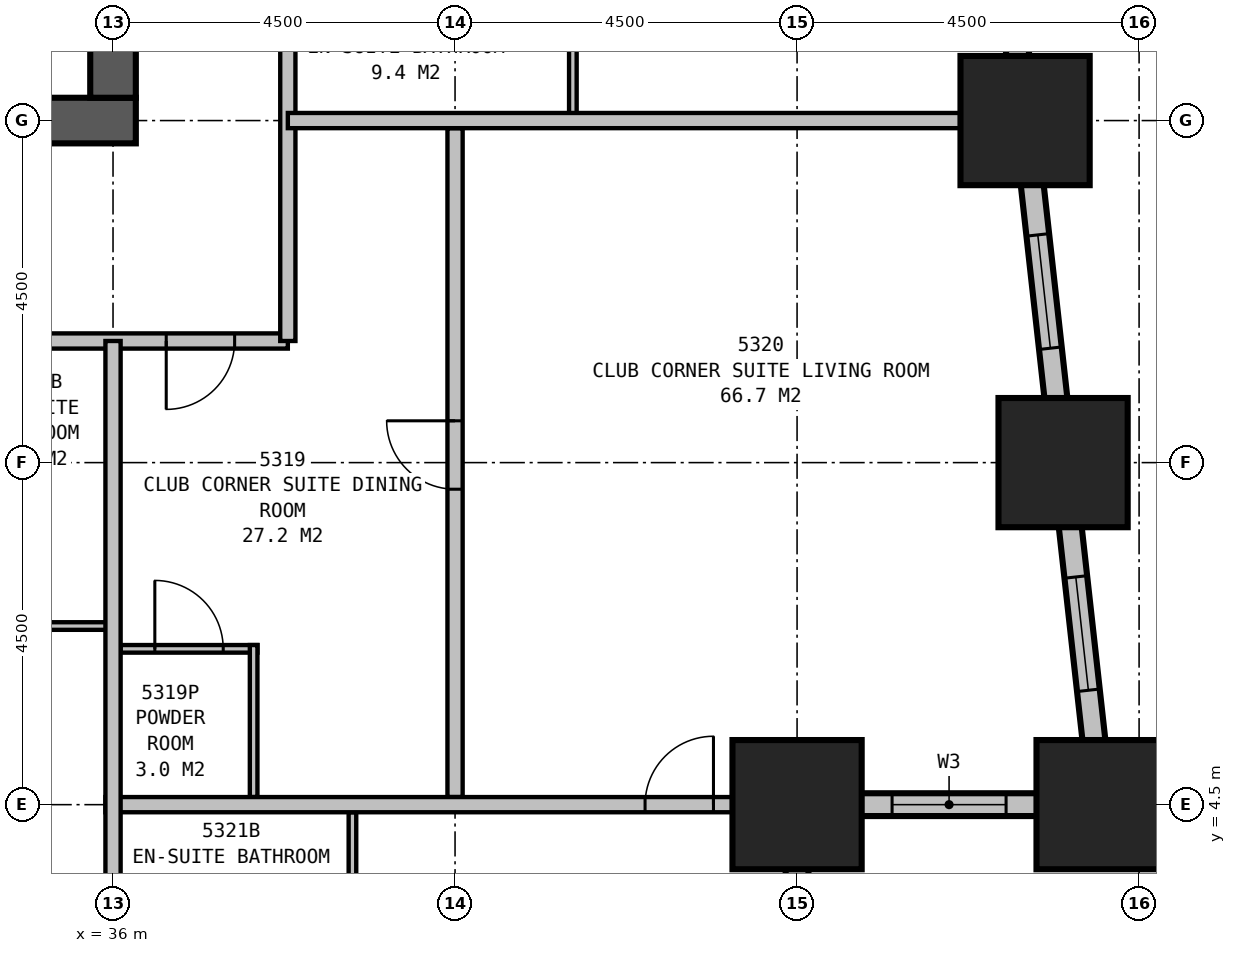
"""IFC4 building model, lengths in metres.
Left out: names, types, materials, properties, quantities, classifications, styles, units other than length and angle.
Written with IfcOpenShell. Run it as: python <this file> out.ifc"""

import sys

from ifc_helpers import new_model, si_unit, direction, frame, frame_2d, origin, origin_2d, place, context, subcontext, project, spatial, rectangle, extrude, element, fill, save


model = new_model("IFC4")
c1 = context("Model", 3, precision=1e-05, world=origin(), true_north=direction((0.0, 1.0)))
c2 = subcontext(c1, "Body", "Model", "MODEL_VIEW")
j1 = project(units=[si_unit("LENGTHUNIT", "METRE"), si_unit("PLANEANGLEUNIT", "RADIAN")], contexts=[c1])
p1 = place(None, origin())
s1 = spatial("IfcSite", under=j1, at=p1, CompositionType="ELEMENT")
p2 = place(p1, origin())
s2 = spatial("IfcBuilding", under=s1, at=p2, CompositionType="ELEMENT")
p3 = place(p2, frame((0.0, 0.0, 204.4)))
s3 = spatial("IfcBuildingStorey", under=s2, at=p3, CompositionType="ELEMENT", Elevation=204.4)
for number, where, z_axis, x_axis in (
    (1, (45.0, 4.5, 0.0), (0.0, 0.0, 1.0), (1.0, 0.0, 0.0)),
    (2, (49.0, 4.5, 0.0), (0.0, 0.0, 1.0), (1.0, 0.0, 0.0)),
    (3, (48.5, 9.0, 0.0), (0.0, 0.0, 1.0), (1.0, 0.0, 0.0)),
    (4, (48.0, 13.5, 0.0), (0.0, 0.0, 1.0), (1.0, 0.0, 0.0)),
):
    element("IfcColumn", number, at=place(p3, frame(where, z_axis=z_axis, x_axis=x_axis)), inside=s3, PredefinedType="COLUMN", context=c2, shape_type="SweptSolid", body=[
        extrude(rectangle(XDim=1.7, YDim=1.7, at=origin_2d()), origin(), (0.0, 0.0, 1.0), 3.5),
    ])
p4 = place(p3, frame((13.2, 13.5, 0.0), z_axis=(0.0, 0.0, 1.0), x_axis=(1.0, 0.0, 0.0)))
e5 = element("IfcWall", 5, at=p4, inside=s3, PredefinedType="SHEAR", context=c2, shape_type="SweptSolid", body=[
    extrude(rectangle(XDim=23.1, YDim=0.6, at=frame_2d((11.55, 0.0))), origin(), (0.0, 0.0, 1.0), 3.5),
])
p5 = place(p3, frame((36.0, 13.8, 0.0), z_axis=(0.0, 0.0, 1.0), x_axis=(0.0, 1.0, 0.0)))
e6 = element("IfcWall", 6, at=p5, inside=s3, PredefinedType="SHEAR", context=c2, shape_type="SweptSolid", body=[
    extrude(rectangle(XDim=2.7, YDim=0.6, at=frame_2d((1.35, 0.0))), origin(), (0.0, 0.0, 1.0), 3.5),
])
p6 = place(p3, frame((45.0, -0.15, 0.0), z_axis=(0.0, 0.0, 1.0), x_axis=(0.0, 1.0, 0.0)))
e7 = element("IfcWall", 7, at=p6, inside=s3, PredefinedType="STANDARD", context=c2, shape_type="SweptSolid", body=[
    extrude(rectangle(XDim=4.8, YDim=0.3, at=frame_2d((2.4, 0.0))), origin(), (0.0, 0.0, 1.0), 2.25),
])
p7 = place(p6, frame((1.2, 0.0, 0.5)))
e8 = element("IfcOpeningElement", 8, at=p7, cuts=e7, PredefinedType="OPENING", context=c2, shape_type="SweptSolid", body=[
    extrude(rectangle(XDim=2.4, YDim=1.6, at=frame_2d((1.2, 0.8))), frame((0.0, 0.16, 0.0), z_axis=(0.0, -1.0, 0.0), x_axis=(1.0, 0.0, 0.0)), (0.0, 0.0, 1.0), 0.32),
])
p8 = place(p3, frame((44.85, 4.5, 0.0), z_axis=(0.0, 0.0, 1.0), x_axis=(1.0, 0.0, 0.0)))
e9 = element("IfcWall", 9, at=p8, inside=s3, PredefinedType="STANDARD", context=c2, shape_type="SweptSolid", body=[
    extrude(rectangle(XDim=4.3, YDim=0.3, at=frame_2d((2.15, 0.0))), origin(), (0.0, 0.0, 1.0), 2.25),
])
p9 = place(p8, frame((1.4, 0.0, 0.5)))
e10 = element("IfcOpeningElement", 10, at=p9, cuts=e9, PredefinedType="OPENING", context=c2, shape_type="SweptSolid", body=[
    extrude(rectangle(XDim=1.5, YDim=1.6, at=frame_2d((0.75, 0.8))), frame((0.0, 0.16, 0.0), z_axis=(0.0, -1.0, 0.0), x_axis=(1.0, 0.0, 0.0)), (0.0, 0.0, 1.0), 0.32),
])
p10 = place(p3, frame((49.017, 4.351, 0.0), z_axis=(0.0, 0.0, 1.0), x_axis=(-0.110433201132, 0.993883548555, 0.0)))
e11 = element("IfcWall", 11, at=p10, inside=s3, PredefinedType="STANDARD", context=c2, shape_type="SweptSolid", body=[
    extrude(rectangle(XDim=31.994, YDim=0.3, at=frame_2d((15.997, 0.0))), origin(), (0.0, 0.0, 1.0), 2.25),
])
p11 = place(p10, frame((1.664, 0.0, 0.5)))
e12 = element("IfcOpeningElement", 12, at=p11, cuts=e11, PredefinedType="OPENING", context=c2, shape_type="SweptSolid", body=[
    extrude(rectangle(XDim=1.5, YDim=1.6, at=frame_2d((0.75, 0.8))), frame((0.0, 0.16, 0.0), z_axis=(0.0, -1.0, 0.0), x_axis=(1.0, 0.0, 0.0)), (0.0, 0.0, 1.0), 0.32),
])
p12 = place(p10, frame((6.192, 0.0, 0.5)))
e13 = element("IfcOpeningElement", 13, at=p12, cuts=e11, PredefinedType="OPENING", context=c2, shape_type="SweptSolid", body=[
    extrude(rectangle(XDim=1.5, YDim=1.6, at=frame_2d((0.75, 0.8))), frame((0.0, 0.16, 0.0), z_axis=(0.0, -1.0, 0.0), x_axis=(1.0, 0.0, 0.0)), (0.0, 0.0, 1.0), 0.32),
])
p13 = place(p10, frame((10.719, 0.0, 0.5)))
e14 = element("IfcOpeningElement", 14, at=p13, cuts=e11, PredefinedType="OPENING", context=c2, shape_type="SweptSolid", body=[
    extrude(rectangle(XDim=1.5, YDim=1.6, at=frame_2d((0.75, 0.8))), frame((0.0, 0.16, 0.0), z_axis=(0.0, -1.0, 0.0), x_axis=(1.0, 0.0, 0.0)), (0.0, 0.0, 1.0), 0.32),
])
p14 = place(p10, frame((15.247, 0.0, 0.5)))
e15 = element("IfcOpeningElement", 15, at=p14, cuts=e11, PredefinedType="OPENING", context=c2, shape_type="SweptSolid", body=[
    extrude(rectangle(XDim=1.5, YDim=1.6, at=frame_2d((0.75, 0.8))), frame((0.0, 0.16, 0.0), z_axis=(0.0, -1.0, 0.0), x_axis=(1.0, 0.0, 0.0)), (0.0, 0.0, 1.0), 0.32),
])
p15 = place(p10, frame((19.775, 0.0, 0.5)))
e16 = element("IfcOpeningElement", 16, at=p15, cuts=e11, PredefinedType="OPENING", context=c2, shape_type="SweptSolid", body=[
    extrude(rectangle(XDim=1.5, YDim=1.6, at=frame_2d((0.75, 0.8))), frame((0.0, 0.16, 0.0), z_axis=(0.0, -1.0, 0.0), x_axis=(1.0, 0.0, 0.0)), (0.0, 0.0, 1.0), 0.32),
])
p16 = place(p10, frame((24.302, 0.0, 0.5)))
e17 = element("IfcOpeningElement", 17, at=p16, cuts=e11, PredefinedType="OPENING", context=c2, shape_type="SweptSolid", body=[
    extrude(rectangle(XDim=1.5, YDim=1.6, at=frame_2d((0.75, 0.8))), frame((0.0, 0.16, 0.0), z_axis=(0.0, -1.0, 0.0), x_axis=(1.0, 0.0, 0.0)), (0.0, 0.0, 1.0), 0.32),
])
p17 = place(p10, frame((28.83, 0.0, 0.5)))
e18 = element("IfcOpeningElement", 18, at=p17, cuts=e11, PredefinedType="OPENING", context=c2, shape_type="SweptSolid", body=[
    extrude(rectangle(XDim=1.5, YDim=1.6, at=frame_2d((0.75, 0.8))), frame((0.0, 0.16, 0.0), z_axis=(0.0, -1.0, 0.0), x_axis=(1.0, 0.0, 0.0)), (0.0, 0.0, 1.0), 0.32),
])
p18 = place(p3, frame((11.2, 10.6, 0.0), z_axis=(0.0, 0.0, 1.0), x_axis=(1.0, 0.0, 0.0)))
e19 = element("IfcWall", 19, at=p18, inside=s3, PredefinedType="PARTITIONING", context=c2, shape_type="SweptSolid", body=[
    extrude(rectangle(XDim=27.1, YDim=0.2, at=frame_2d((13.55, 0.0))), origin(), (0.0, 0.0, 1.0), 3.25),
])
p19 = place(p18, frame((3.5, 0.0, 0.0), z_axis=(0.0, 0.0, 1.0), x_axis=(-1.0, 0.0, 0.0)))
e20 = element("IfcOpeningElement", 20, at=p19, cuts=e19, PredefinedType="OPENING", context=c2, shape_type="SweptSolid", body=[
    extrude(rectangle(XDim=0.9, YDim=2.1, at=frame_2d((0.45, 1.05))), frame((0.0, 0.11, 0.0), z_axis=(0.0, -1.0, 0.0), x_axis=(1.0, 0.0, 0.0)), (0.0, 0.0, 1.0), 0.22),
])
p20 = place(p18, frame((16.35, 0.0, 0.0), z_axis=(0.0, 0.0, 1.0), x_axis=(-1.0, 0.0, 0.0)))
e21 = element("IfcOpeningElement", 21, at=p20, cuts=e19, PredefinedType="OPENING", context=c2, shape_type="SweptSolid", body=[
    extrude(rectangle(XDim=1.0, YDim=2.1, at=frame_2d((0.5, 1.05))), frame((0.0, 0.11, 0.0), z_axis=(0.0, -1.0, 0.0), x_axis=(1.0, 0.0, 0.0)), (0.0, 0.0, 1.0), 0.22),
])
p21 = place(p18, frame((21.65, 0.0, 0.0), z_axis=(0.0, 0.0, 1.0), x_axis=(-1.0, 0.0, 0.0)))
e22 = element("IfcOpeningElement", 22, at=p21, cuts=e19, PredefinedType="OPENING", context=c2, shape_type="SweptSolid", body=[
    extrude(rectangle(XDim=0.9, YDim=2.1, at=frame_2d((0.45, 1.05))), frame((0.0, 0.11, 0.0), z_axis=(0.0, -1.0, 0.0), x_axis=(1.0, 0.0, 0.0)), (0.0, 0.0, 1.0), 0.22),
])
p22 = place(p18, frame((1.6, 0.0, 0.0), z_axis=(0.0, 0.0, 1.0), x_axis=(-1.0, 0.0, 0.0)))
e23 = element("IfcOpeningElement", 23, at=p22, cuts=e19, PredefinedType="OPENING", context=c2, shape_type="SweptSolid", body=[
    extrude(rectangle(XDim=0.9, YDim=2.1, at=frame_2d((0.45, 1.05))), frame((0.0, 0.11, 0.0), z_axis=(0.0, -1.0, 0.0), x_axis=(1.0, 0.0, 0.0)), (0.0, 0.0, 1.0), 0.22),
])
p23 = place(p18, frame((26.4, 0.0, 0.0), z_axis=(0.0, 0.0, 1.0), x_axis=(-1.0, 0.0, 0.0)))
e24 = element("IfcOpeningElement", 24, at=p23, cuts=e19, PredefinedType="OPENING", context=c2, shape_type="SweptSolid", body=[
    extrude(rectangle(XDim=0.9, YDim=2.1, at=frame_2d((0.45, 1.05))), frame((0.0, 0.11, 0.0), z_axis=(0.0, -1.0, 0.0), x_axis=(1.0, 0.0, 0.0)), (0.0, 0.0, 1.0), 0.22),
])
p24 = place(p3, frame((38.3, 10.6, 0.0), z_axis=(0.0, 0.0, 1.0), x_axis=(0.0, 1.0, 0.0)))
e25 = element("IfcWall", 25, at=p24, inside=s3, PredefinedType="PARTITIONING", context=c2, shape_type="SweptSolid", body=[
    extrude(rectangle(XDim=18.7, YDim=0.2, at=frame_2d((9.35, 0.0))), origin(), (0.0, 0.0, 1.0), 3.25),
])
p25 = place(p24, frame((6.95, 0.0, 0.0), z_axis=(0.0, 0.0, 1.0), x_axis=(-1.0, 0.0, 0.0)))
e26 = element("IfcOpeningElement", 26, at=p25, cuts=e25, PredefinedType="OPENING", context=c2, shape_type="SweptSolid", body=[
    extrude(rectangle(XDim=0.9, YDim=2.1, at=frame_2d((0.45, 1.05))), frame((0.0, 0.11, 0.0), z_axis=(0.0, -1.0, 0.0), x_axis=(1.0, 0.0, 0.0)), (0.0, 0.0, 1.0), 0.22),
])
p26 = place(p24, frame((10.9, 0.0, 0.0), z_axis=(0.0, 0.0, 1.0), x_axis=(-1.0, 0.0, 0.0)))
e27 = element("IfcOpeningElement", 27, at=p26, cuts=e25, PredefinedType="OPENING", context=c2, shape_type="SweptSolid", body=[
    extrude(rectangle(XDim=0.9, YDim=2.1, at=frame_2d((0.45, 1.05))), frame((0.0, 0.11, 0.0), z_axis=(0.0, -1.0, 0.0), x_axis=(1.0, 0.0, 0.0)), (0.0, 0.0, 1.0), 0.22),
])
for number, where, z_axis, x_axis in (
    (28, (33.2, 6.85, 0.0), (0.0, 0.0, 1.0), (1.0, 0.0, 0.0)),
    (29, (42.05, 13.5, 0.0), (0.0, 0.0, 1.0), (0.0, 1.0, 0.0)),
):
    element("IfcWall", number, at=place(p3, frame(where, z_axis=z_axis, x_axis=x_axis)), inside=s3, PredefinedType="PLUMBINGWALL", context=c2, shape_type="SweptSolid", body=[
        extrude(rectangle(XDim=2.8, YDim=0.1, at=frame_2d((1.4, 0.0))), origin(), (0.0, 0.0, 1.0), 3.25),
    ])
p27 = place(p3, frame((38.3, 13.5, 0.0), z_axis=(0.0, 0.0, 1.0), x_axis=(1.0, 0.0, 0.0)))
e30 = element("IfcWall", 30, at=p27, inside=s3, PredefinedType="PARTITIONING", context=c2, shape_type="SweptSolid", body=[
    extrude(rectangle(XDim=9.921, YDim=0.2, at=frame_2d((4.96, 0.0))), origin(), (0.0, 0.0, 1.0), 1.95),
])
p28 = place(p3, frame((36.0, 10.6, 0.0), z_axis=(0.0, 0.0, 1.0), x_axis=(0.0, -1.0, 0.0)))
e31 = element("IfcWall", 31, at=p28, inside=s3, PredefinedType="PARTITIONING", context=c2, shape_type="SweptSolid", body=[
    extrude(rectangle(XDim=10.6, YDim=0.2, at=frame_2d((5.3, 0.0))), origin(), (0.0, 0.0, 1.0), 2.25),
])
p29 = place(p3, frame((35.9, 4.5, 0.0), z_axis=(0.0, 0.0, 1.0), x_axis=(1.0, 0.0, 0.0)))
e32 = element("IfcWall", 32, at=p29, inside=s3, PredefinedType="PARTITIONING", context=c2, shape_type="SweptSolid", body=[
    extrude(rectangle(XDim=9.1, YDim=0.2, at=frame_2d((4.55, 0.0))), origin(), (0.0, 0.0, 1.0), 3.25),
])
p30 = place(p29, frame((7.1, 0.0, 0.0)))
e33 = element("IfcOpeningElement", 33, at=p30, cuts=e32, PredefinedType="OPENING", context=c2, shape_type="SweptSolid", body=[
    extrude(rectangle(XDim=0.9, YDim=2.1, at=frame_2d((0.45, 1.05))), frame((0.0, 0.11, 0.0), z_axis=(0.0, -1.0, 0.0), x_axis=(1.0, 0.0, 0.0)), (0.0, 0.0, 1.0), 0.22),
])
p31 = place(p3, frame((40.5, 4.6, 0.0), z_axis=(0.0, 0.0, 1.0), x_axis=(0.0, 1.0, 0.0)))
e34 = element("IfcWall", 34, at=p31, inside=s3, PredefinedType="PARTITIONING", context=c2, shape_type="SweptSolid", body=[
    extrude(rectangle(XDim=8.8, YDim=0.2, at=frame_2d((4.4, 0.0))), origin(), (0.0, 0.0, 1.0), 2.25),
])
p32 = place(p31, frame((4.05, 0.0, 0.0)))
e35 = element("IfcOpeningElement", 35, at=p32, cuts=e34, PredefinedType="OPENING", context=c2, shape_type="SweptSolid", body=[
    extrude(rectangle(XDim=0.9, YDim=2.1, at=frame_2d((0.45, 1.05))), frame((0.0, 0.11, 0.0), z_axis=(0.0, -1.0, 0.0), x_axis=(1.0, 0.0, 0.0)), (0.0, 0.0, 1.0), 0.22),
])
p33 = place(p3, frame((37.85, 4.6, 0.0), z_axis=(0.0, 0.0, 1.0), x_axis=(0.0, 1.0, 0.0)))
e36 = element("IfcWall", 36, at=p33, inside=s3, PredefinedType="PLUMBINGWALL", context=c2, shape_type="SweptSolid", body=[
    extrude(rectangle(XDim=2.0, YDim=0.1, at=frame_2d((1.0, 0.0))), origin(), (0.0, 0.0, 1.0), 3.25),
])
p34 = place(p3, frame((36.1, 6.55, 0.0), z_axis=(0.0, 0.0, 1.0), x_axis=(1.0, 0.0, 0.0)))
e37 = element("IfcWall", 37, at=p34, inside=s3, PredefinedType="PLUMBINGWALL", context=c2, shape_type="SweptSolid", body=[
    extrude(rectangle(XDim=1.8, YDim=0.1, at=frame_2d((0.9, 0.0))), origin(), (0.0, 0.0, 1.0), 3.25),
])
p35 = place(p34, frame((0.45, 0.0, 0.0)))
e38 = element("IfcOpeningElement", 38, at=p35, cuts=e37, PredefinedType="OPENING", context=c2, shape_type="SweptSolid", body=[
    extrude(rectangle(XDim=0.9, YDim=2.1, at=frame_2d((0.45, 1.05))), frame((0.0, 0.06, 0.0), z_axis=(0.0, -1.0, 0.0), x_axis=(1.0, 0.0, 0.0)), (0.0, 0.0, 1.0), 0.12),
])
p36 = place(p3, frame((39.15, 4.4, 0.0), z_axis=(0.0, 0.0, 1.0), x_axis=(0.0, -1.0, 0.0)))
e39 = element("IfcWall", 39, at=p36, inside=s3, PredefinedType="PLUMBINGWALL", context=c2, shape_type="SweptSolid", body=[
    extrude(rectangle(XDim=2.3, YDim=0.1, at=frame_2d((1.15, 0.0))), origin(), (0.0, 0.0, 1.0), 3.25),
])
p37 = place(p9, origin())
e40 = element("IfcWindow", 40, at=p37, inside=s3, PartitioningType="SINGLE_PANEL", PredefinedType="WINDOW", context=c2, shape_type="SweptSolid", body=[
    extrude(rectangle(XDim=1.5, YDim=1.6, at=frame_2d((0.75, 0.8))), frame((0.0, 0.03, 0.0), z_axis=(0.0, -1.0, 0.0), x_axis=(1.0, 0.0, 0.0)), (0.0, 0.0, 1.0), 0.06),
])
fill(e10, e40)
p38 = place(p11, origin())
e41 = element("IfcWindow", 41, at=p38, inside=s3, PartitioningType="SINGLE_PANEL", PredefinedType="WINDOW", context=c2, shape_type="SweptSolid", body=[
    extrude(rectangle(XDim=1.5, YDim=1.6, at=frame_2d((0.75, 0.8))), frame((0.0, 0.03, 0.0), z_axis=(0.0, -1.0, 0.0), x_axis=(1.0, 0.0, 0.0)), (0.0, 0.0, 1.0), 0.06),
])
fill(e12, e41)
p39 = place(p12, origin())
e42 = element("IfcWindow", 42, at=p39, inside=s3, PartitioningType="SINGLE_PANEL", PredefinedType="WINDOW", context=c2, shape_type="SweptSolid", body=[
    extrude(rectangle(XDim=1.5, YDim=1.6, at=frame_2d((0.75, 0.8))), frame((0.0, 0.03, 0.0), z_axis=(0.0, -1.0, 0.0), x_axis=(1.0, 0.0, 0.0)), (0.0, 0.0, 1.0), 0.06),
])
fill(e13, e42)
p40 = place(p23, origin())
e43 = element("IfcDoor", 43, at=p40, inside=s3, OperationType="SINGLE_SWING_RIGHT", PredefinedType="DOOR", context=c2, shape_type="SweptSolid", body=[
    extrude(rectangle(XDim=0.9, YDim=2.1, at=frame_2d((0.45, 1.05))), frame((0.0, 0.025, 0.0), z_axis=(0.0, -1.0, 0.0), x_axis=(1.0, 0.0, 0.0)), (0.0, 0.0, 1.0), 0.05),
])
fill(e24, e43)
p41 = place(p30, origin())
e44 = element("IfcDoor", 44, at=p41, inside=s3, OperationType="SINGLE_SWING_RIGHT", PredefinedType="DOOR", context=c2, shape_type="SweptSolid", body=[
    extrude(rectangle(XDim=0.9, YDim=2.1, at=frame_2d((0.45, 1.05))), frame((0.0, 0.025, 0.0), z_axis=(0.0, -1.0, 0.0), x_axis=(1.0, 0.0, 0.0)), (0.0, 0.0, 1.0), 0.05),
])
fill(e33, e44)
p42 = place(p32, origin())
e45 = element("IfcDoor", 45, at=p42, inside=s3, OperationType="SINGLE_SWING_RIGHT", PredefinedType="DOOR", context=c2, shape_type="SweptSolid", body=[
    extrude(rectangle(XDim=0.9, YDim=2.1, at=frame_2d((0.45, 1.05))), frame((0.0, 0.025, 0.0), z_axis=(0.0, -1.0, 0.0), x_axis=(1.0, 0.0, 0.0)), (0.0, 0.0, 1.0), 0.05),
])
fill(e35, e45)
p43 = place(p35, origin())
e46 = element("IfcDoor", 46, at=p43, inside=s3, OperationType="SINGLE_SWING_LEFT", PredefinedType="DOOR", context=c2, shape_type="SweptSolid", body=[
    extrude(rectangle(XDim=0.9, YDim=2.1, at=frame_2d((0.45, 1.05))), frame((0.0, 0.025, 0.0), z_axis=(0.0, -1.0, 0.0), x_axis=(1.0, 0.0, 0.0)), (0.0, 0.0, 1.0), 0.05),
])
fill(e38, e46)
save(model, sys.argv[1])
